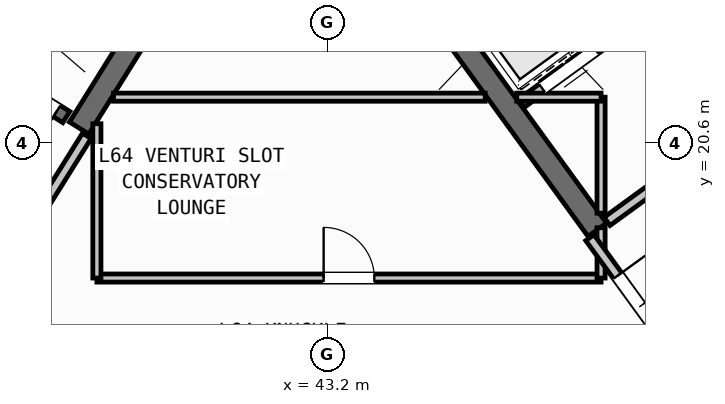
"""IFC4 building model, lengths in metres.
Left out: names, types, materials, properties, quantities, classifications, styles, units other than length and angle.
Written with IfcOpenShell. Run it as: python <this file> out.ifc"""

import sys

from ifc_helpers import new_model, si_unit, direction, frame, frame_2d, origin, place, context, subcontext, project, spatial, rectangle, extrude, source, transform, mapped, element, fill, save


model = new_model("IFC4")
c1 = context("Model", 3, precision=1e-05, world=origin(), true_north=direction((0.0, 1.0)))
c2 = subcontext(c1, "Body", "Model", "MODEL_VIEW")
j1 = project(units=[si_unit("LENGTHUNIT", "METRE"), si_unit("PLANEANGLEUNIT", "RADIAN")], contexts=[c1])
p1 = place(None, origin())
s1 = spatial("IfcSite", under=j1, at=p1, CompositionType="ELEMENT")
p2 = place(p1, origin())
s2 = spatial("IfcBuilding", under=s1, at=p2, CompositionType="ELEMENT")
p3 = place(p2, frame((0.0, 0.0, 254.7)))
s3 = spatial("IfcBuildingStorey", under=s2, at=p3, CompositionType="ELEMENT", Elevation=254.7)
p4 = place(p3, frame((40.221, 23.965, 0.0), z_axis=(0.0, 0.0, 1.0), x_axis=(-0.529902075036, -0.848058836916, 0.0)))
e1 = element("IfcWall", 1, at=p4, inside=s3, PredefinedType="SHEAR", context=c2, shape_type="SweptSolid", body=[
    extrude(rectangle(XDim=3.625, YDim=0.45, at=frame_2d((1.812, 0.0))), origin(), (0.0, 0.0, 1.0), 4.25),
])
p5 = place(p3, frame((48.526, 18.884, 0.0), z_axis=(0.0, 0.0, 1.0), x_axis=(-0.587774812919, 0.809024578921, 0.0)))
e2 = element("IfcWall", 2, at=p5, inside=s3, PredefinedType="SHEAR", context=c2, shape_type="SweptSolid", body=[
    extrude(rectangle(XDim=6.475, YDim=0.45, at=frame_2d((3.238, 0.0))), origin(), (0.0, 0.0, 1.0), 4.25),
])
p6 = place(p3, frame((38.046, 21.108, 0.0), z_axis=(0.0, 0.0, 1.0), x_axis=(-0.848054434086, 0.529909121291, 0.0)))
e3 = element("IfcWall", 3, at=p6, inside=s3, PredefinedType="SHEAR", context=c2, shape_type="SweptSolid", body=[
    extrude(rectangle(XDim=7.33, YDim=0.26, at=frame_2d((3.665, 0.0))), origin(), (0.0, 0.0, 1.0), 4.25),
])
p7 = place(p6, frame((0.22, 0.0, 0.0)))
e4 = element("IfcOpeningElement", 4, at=p7, cuts=e3, PredefinedType="OPENING", context=c2, shape_type="SweptSolid", body=[
    extrude(rectangle(XDim=1.1, YDim=2.1, at=frame_2d((0.55, 1.05))), frame((0.0, 0.14, 0.0), z_axis=(0.0, -1.0, 0.0), x_axis=(1.0, 0.0, 0.0)), (0.0, 0.0, 1.0), 0.28),
])
p8 = place(p3, frame((47.025, 21.378, 0.0), z_axis=(0.0, 0.0, 1.0), x_axis=(0.809052869724, 0.587735870941, 0.0)))
e5 = element("IfcWall", 5, at=p8, inside=s3, PredefinedType="STANDARD", context=c2, shape_type="SweptSolid", body=[
    extrude(rectangle(XDim=3.498, YDim=0.2, at=frame_2d((1.749, 0.0))), origin(), (0.0, 0.0, 1.0), 4.24),
])
p9 = place(p8, frame((0.508, 0.0, 0.0)))
e6 = element("IfcOpeningElement", 6, at=p9, cuts=e5, PredefinedType="OPENING", context=c2, shape_type="SweptSolid", body=[
    extrude(rectangle(XDim=1.3, YDim=2.2, at=frame_2d((0.65, 1.1))), frame((0.0, 0.11, 0.0), z_axis=(0.0, -1.0, 0.0), x_axis=(1.0, 0.0, 0.0)), (0.0, 0.0, 1.0), 0.22),
])
p10 = place(p3, frame((48.718, 19.048, 0.0), z_axis=(0.0, 0.0, 1.0), x_axis=(0.809017261719, 0.587784884325, 0.0)))
e7 = element("IfcWall", 7, at=p10, inside=s3, PredefinedType="STANDARD", context=c2, shape_type="SweptSolid", body=[
    extrude(rectangle(XDim=5.818, YDim=0.2, at=frame_2d((2.909, 0.0))), origin(), (0.0, 0.0, 1.0), 4.24),
])
p11 = place(p10, frame((2.598, 0.0, 0.0)))
e8 = element("IfcOpeningElement", 8, at=p11, cuts=e7, PredefinedType="OPENING", context=c2, shape_type="SweptSolid", body=[
    extrude(rectangle(XDim=1.15, YDim=2.1, at=frame_2d((0.575, 1.05))), frame((0.0, 0.11, 0.0), z_axis=(0.0, -1.0, 0.0), x_axis=(1.0, 0.0, 0.0)), (0.0, 0.0, 1.0), 0.22),
])
p12 = place(p3, frame((38.451, 20.737, 0.0), z_axis=(0.0, 0.0, 1.0), x_axis=(-0.529924799939, -0.848044637038, 0.0)))
e9 = element("IfcWall", 9, at=p12, inside=s3, PredefinedType="STANDARD", context=c2, shape_type="SweptSolid", body=[
    extrude(rectangle(XDim=2.96, YDim=0.2, at=frame_2d((1.48, 0.0))), origin(), (0.0, 0.0, 1.0), 4.24),
])
p13 = place(p12, frame((1.46, 0.0, 0.0)))
e10 = element("IfcOpeningElement", 10, at=p13, cuts=e9, PredefinedType="OPENING", context=c2, shape_type="SweptSolid", body=[
    extrude(rectangle(XDim=0.86, YDim=2.05, at=frame_2d((0.43, 1.025))), frame((0.0, 0.11, 0.0), z_axis=(0.0, -1.0, 0.0), x_axis=(1.0, 0.0, 0.0)), (0.0, 0.0, 1.0), 0.22),
])
p14 = place(p3, frame((38.65, 17.93, 0.0), z_axis=(0.0, 0.0, 1.0), x_axis=(1.0, 0.0, 0.0)))
e11 = element("IfcWall", 11, at=p14, inside=s3, PredefinedType="PARTITIONING", context=c2, shape_type="SweptSolid", body=[
    extrude(rectangle(XDim=9.95, YDim=0.16, at=frame_2d((4.975, 0.0))), origin(), (0.0, 0.0, 1.0), 4.24),
])
p15 = place(p14, frame((4.475, 0.0, 0.0)))
e12 = element("IfcOpeningElement", 12, at=p15, cuts=e11, PredefinedType="OPENING", context=c2, shape_type="SweptSolid", body=[
    extrude(rectangle(XDim=1.0, YDim=2.1, at=frame_2d((0.5, 1.05))), frame((0.0, 0.09, 0.0), z_axis=(0.0, -1.0, 0.0), x_axis=(1.0, 0.0, 0.0)), (0.0, 0.0, 1.0), 0.18),
])
p16 = place(p3, frame((38.65, 17.93, 0.0), z_axis=(0.0, 0.0, 1.0), x_axis=(0.0, 1.0, 0.0)))
e13 = element("IfcWall", 13, at=p16, inside=s3, PredefinedType="PARTITIONING", context=c2, shape_type="SweptSolid", body=[
    extrude(rectangle(XDim=3.046, YDim=0.16, at=frame_2d((1.523, 0.0))), origin(), (0.0, 0.0, 1.0), 4.24),
])
p17 = place(p3, frame((48.6, 17.93, 0.0), z_axis=(0.0, 0.0, 1.0), x_axis=(0.0, 1.0, 0.0)))
e14 = element("IfcWall", 14, at=p17, inside=s3, PredefinedType="PARTITIONING", context=c2, shape_type="SweptSolid", body=[
    extrude(rectangle(XDim=0.993, YDim=0.16, at=frame_2d((0.496, 0.0))), origin(), (0.0, 0.0, 1.0), 4.24),
])
p18 = place(p3, frame((48.6, 19.21, 0.0), z_axis=(0.0, 0.0, 1.0), x_axis=(0.0, 1.0, 0.0)))
e15 = element("IfcWall", 15, at=p18, inside=s3, PredefinedType="PARTITIONING", context=c2, shape_type="SweptSolid", body=[
    extrude(rectangle(XDim=2.29, YDim=0.16, at=frame_2d((1.145, 0.0))), origin(), (0.0, 0.0, 1.0), 4.24),
])
p19 = place(p3, frame((38.978, 21.5, 0.0), z_axis=(0.0, 0.0, 1.0), x_axis=(1.0, 0.0, 0.0)))
e16 = element("IfcWall", 16, at=p19, inside=s3, PredefinedType="PARTITIONING", context=c2, shape_type="SweptSolid", body=[
    extrude(rectangle(XDim=7.336, YDim=0.16, at=frame_2d((3.668, 0.0))), origin(), (0.0, 0.0, 1.0), 4.24),
])
p20 = place(p3, frame((46.936, 21.5, 0.0), z_axis=(0.0, 0.0, 1.0), x_axis=(1.0, 0.0, 0.0)))
e17 = element("IfcWall", 17, at=p20, inside=s3, PredefinedType="PARTITIONING", context=c2, shape_type="SweptSolid", body=[
    extrude(rectangle(XDim=1.664, YDim=0.16, at=frame_2d((0.832, 0.0))), origin(), (0.0, 0.0, 1.0), 4.24),
])
p21 = place(p3, frame((50.119, 16.333, 0.0), z_axis=(0.0, 0.0, 1.0), x_axis=(-0.587749856981, 0.809042709391, 0.0)))
e18 = element("IfcWall", 18, at=p21, inside=s3, PredefinedType="STANDARD", context=c2, shape_type="SweptSolid", body=[
    extrude(rectangle(XDim=2.96, YDim=0.2, at=frame_2d((1.48, 0.0))), origin(), (0.0, 0.0, 1.0), 4.24),
])
p22 = place(p21, frame((0.53, 0.0, 0.0)))
e19 = element("IfcOpeningElement", 19, at=p22, cuts=e18, PredefinedType="OPENING", context=c2, shape_type="SweptSolid", body=[
    extrude(rectangle(XDim=1.5, YDim=2.15, at=frame_2d((0.75, 1.075))), frame((0.0, 0.11, 0.0), z_axis=(0.0, -1.0, 0.0), x_axis=(1.0, 0.0, 0.0)), (0.0, 0.0, 1.0), 0.22),
])
m1 = source(origin(), c2, "Body", "SweptSolid", [
    extrude(rectangle(XDim=1.1, YDim=2.1, at=frame_2d((0.55, 1.05))), frame((0.0, 0.025, 0.0), z_axis=(0.0, -1.0, 0.0), x_axis=(1.0, 0.0, 0.0)), (0.0, 0.0, 1.0), 0.05),
])
p23 = place(p7, origin())
e20 = element("IfcDoor", 20, at=p23, inside=s3, OperationType="SINGLE_SWING_LEFT", PredefinedType="DOOR", context=c2, shape_type="MappedRepresentation", body=[
    mapped(m1, transform((0.0, 0.0, 0.0), scale=1.0)),
])
fill(e4, e20)
m2 = source(origin(), c2, "Body", "SweptSolid", [
    extrude(rectangle(XDim=1.3, YDim=2.2, at=frame_2d((0.65, 1.1))), frame((0.0, 0.025, 0.0), z_axis=(0.0, -1.0, 0.0), x_axis=(1.0, 0.0, 0.0)), (0.0, 0.0, 1.0), 0.05),
])
p24 = place(p9, origin())
e21 = element("IfcDoor", 21, at=p24, inside=s3, OperationType="DOUBLE_DOOR_SLIDING", PredefinedType="DOOR", context=c2, shape_type="MappedRepresentation", body=[
    mapped(m2, transform((0.0, 0.0, 0.0), scale=1.0)),
])
fill(e6, e21)
m3 = source(origin(), c2, "Body", "SweptSolid", [
    extrude(rectangle(XDim=1.0, YDim=2.1, at=frame_2d((0.5, 1.05))), frame((0.0, 0.025, 0.0), z_axis=(0.0, -1.0, 0.0), x_axis=(1.0, 0.0, 0.0)), (0.0, 0.0, 1.0), 0.05),
])
p25 = place(p15, origin())
e22 = element("IfcDoor", 22, at=p25, inside=s3, OperationType="SINGLE_SWING_LEFT", PredefinedType="DOOR", context=c2, shape_type="MappedRepresentation", body=[
    mapped(m3, transform((0.0, 0.0, 0.0), scale=1.0)),
])
fill(e12, e22)
m4 = source(origin(), c2, "Body", "SweptSolid", [
    extrude(rectangle(XDim=1.5, YDim=2.15, at=frame_2d((0.75, 1.075))), frame((0.0, 0.025, 0.0), z_axis=(0.0, -1.0, 0.0), x_axis=(1.0, 0.0, 0.0)), (0.0, 0.0, 1.0), 0.05),
])
p26 = place(p22, frame((1.5, 0.0, 0.0), z_axis=(0.0, 0.0, 1.0), x_axis=(-1.0, 0.0, 0.0)))
e23 = element("IfcDoor", 23, at=p26, inside=s3, OperationType="DOUBLE_DOOR_SINGLE_SWING", PredefinedType="DOOR", context=c2, shape_type="MappedRepresentation", body=[
    mapped(m4, transform((0.0, 0.0, 0.0), scale=1.0)),
])
fill(e19, e23)
save(model, sys.argv[1])
